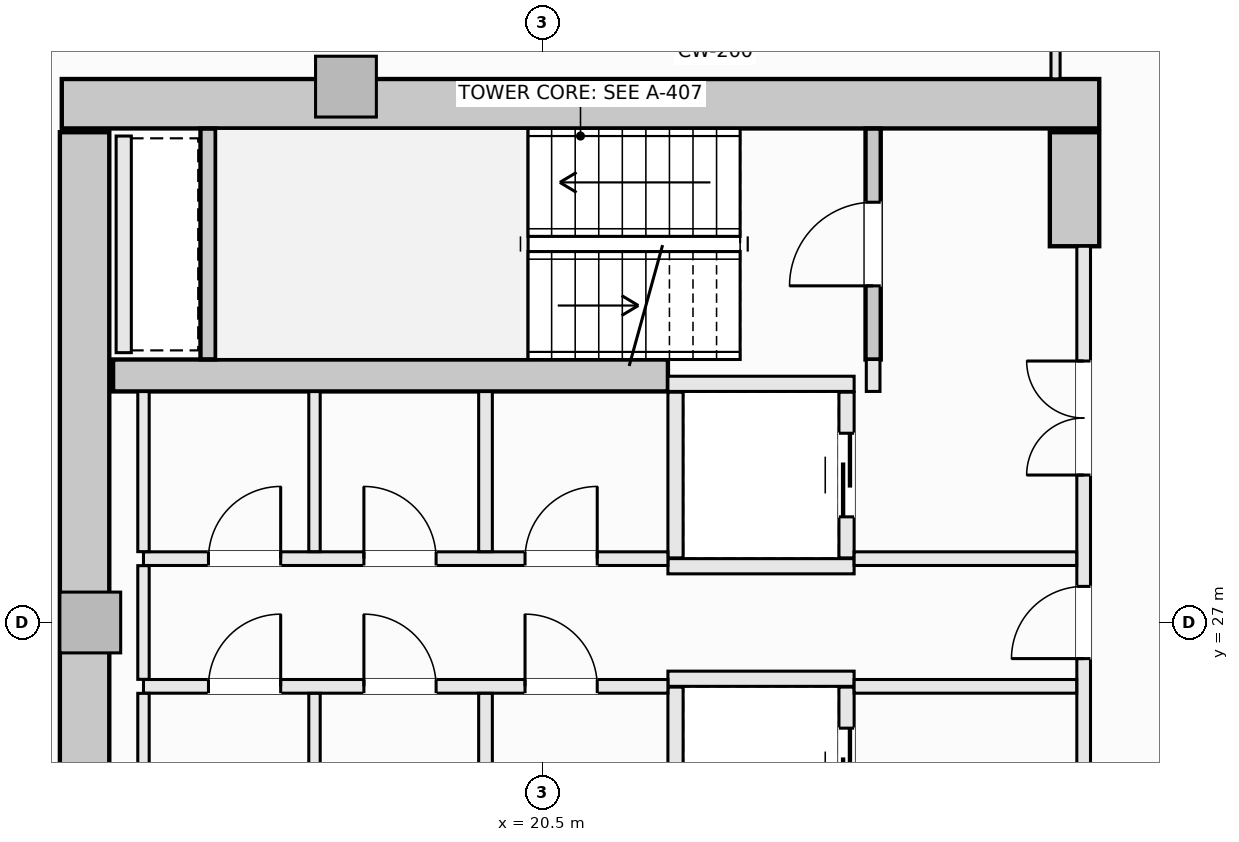
"""IFC4 building model, lengths in metres.
Left out: names, types, materials, properties, quantities, classifications, styles, units other than length and angle.
Written with IfcOpenShell. Run it as: python <this file> out.ifc"""

import sys

from ifc_helpers import new_model, si_unit, direction, frame, frame_2d, origin, origin_2d, place, context, subcontext, project, spatial, rectangle, extrude, element, fill, save


model = new_model("IFC4")
c1 = context("Model", 3, precision=1e-05, world=origin(), true_north=direction((0.0, 1.0)))
c2 = subcontext(c1, "Body", "Model", "MODEL_VIEW")
j1 = project(units=[si_unit("LENGTHUNIT", "METRE"), si_unit("PLANEANGLEUNIT", "RADIAN")], contexts=[c1])
p1 = place(None, origin())
s1 = spatial("IfcSite", under=j1, at=p1, CompositionType="ELEMENT")
p2 = place(p1, origin())
s2 = spatial("IfcBuilding", under=s1, at=p2, CompositionType="ELEMENT")
p3 = place(p2, frame((0.0, 0.0, 159.7)))
s3 = spatial("IfcBuildingStorey", under=s2, at=p3, CompositionType="ELEMENT", Elevation=159.7)
p4 = place(p3, frame((14.175, 33.825, -0.27), z_axis=(0.0, 0.0, 1.0), x_axis=(1.0, 0.0, 0.0)))
e1 = element("IfcWall", 1, at=p4, inside=s3, PredefinedType="SHEAR", context=c2, shape_type="SweptSolid", body=[
    extrude(rectangle(XDim=13.65, YDim=0.65, at=frame_2d((6.825, 0.0))), origin(), (0.0, 0.0, 1.0), 3.4),
])
p5 = place(p3, frame((14.475, 20.55, -0.27), z_axis=(0.0, 0.0, 1.0), x_axis=(0.0, 1.0, 0.0)))
e2 = element("IfcWall", 2, at=p5, inside=s3, PredefinedType="SHEAR", context=c2, shape_type="SweptSolid", body=[
    extrude(rectangle(XDim=12.9, YDim=0.65, at=frame_2d((6.45, 0.0))), origin(), (0.0, 0.0, 1.0), 3.4),
])
p6 = place(p3, frame((27.5, 31.95, -0.27), z_axis=(0.0, 0.0, 1.0), x_axis=(0.0, 1.0, 0.0)))
e3 = element("IfcWall", 3, at=p6, inside=s3, PredefinedType="SHEAR", context=c2, shape_type="SweptSolid", body=[
    extrude(rectangle(XDim=1.5, YDim=0.65, at=frame_2d((0.75, 0.0))), origin(), (0.0, 0.0, 1.0), 3.4),
])
p7 = place(p3, frame((14.85, 30.25, -0.27), z_axis=(0.0, 0.0, 1.0), x_axis=(1.0, 0.0, 0.0)))
e4 = element("IfcWall", 4, at=p7, inside=s3, PredefinedType="SHEAR", context=c2, shape_type="SweptSolid", body=[
    extrude(rectangle(XDim=7.3, YDim=0.42, at=frame_2d((3.65, 0.0))), origin(), (0.0, 0.0, 1.0), 3.4),
])
for number, where, z_axis, x_axis in (
    (5, (17.914, 34.05, -0.27), (0.0, 0.0, 1.0), (1.0, 0.0, 0.0)),
    (6, (14.55, 27.0, -0.27), (0.0, 0.0, 1.0), (1.0, 0.0, 0.0)),
):
    element("IfcColumn", number, at=place(p3, frame(where, z_axis=z_axis, x_axis=x_axis)), inside=s3, PredefinedType="PILASTER", context=c2, shape_type="SweptSolid", body=[
        extrude(rectangle(XDim=0.8, YDim=0.8, at=origin_2d()), origin(), (0.0, 0.0, 1.0), 3.4),
    ])
p8 = place(p3, frame((24.85, 30.46, -0.27), z_axis=(0.0, 0.0, 1.0), x_axis=(0.0, 1.0, 0.0)))
e7 = element("IfcWall", 7, at=p8, inside=s3, PredefinedType="SHEAR", context=c2, shape_type="SweptSolid", body=[
    extrude(rectangle(XDim=3.038, YDim=0.2, at=frame_2d((1.519, 0.0))), origin(), (0.0, 0.0, 1.0), 3.4),
])
p9 = place(p8, frame((0.969, 0.0, 0.27)))
e8 = element("IfcOpeningElement", 8, at=p9, cuts=e7, PredefinedType="OPENING", context=c2, shape_type="SweptSolid", body=[
    extrude(rectangle(XDim=1.1, YDim=2.15, at=frame_2d((0.55, 1.075))), frame((0.0, 0.11, 0.0), z_axis=(0.0, -1.0, 0.0), x_axis=(1.0, 0.0, 0.0)), (0.0, 0.0, 1.0), 0.22),
])
p10 = place(p3, frame((16.1, 30.462, -0.27), z_axis=(0.0, 0.0, 1.0), x_axis=(0.0, 1.0, 0.0)))
e9 = element("IfcWall", 9, at=p10, inside=s3, PredefinedType="SHEAR", context=c2, shape_type="SweptSolid", body=[
    extrude(rectangle(XDim=3.036, YDim=0.2, at=frame_2d((1.518, 0.0))), origin(), (0.0, 0.0, 1.0), 3.4),
])
for number, where, z_axis, x_axis in (
    (10, (22.15, 30.14, 0.0), (0.0, 0.0, 1.0), (1.0, 0.0, 0.0)),
    (11, (22.15, 27.74, 0.0), (0.0, 0.0, 1.0), (1.0, 0.0, 0.0)),
):
    element("IfcWall", number, at=place(p3, frame(where, z_axis=z_axis, x_axis=x_axis)), inside=s3, PredefinedType="SOLIDWALL", context=c2, shape_type="SweptSolid", body=[
        extrude(rectangle(XDim=2.45, YDim=0.2, at=frame_2d((1.225, 0.0))), origin(), (0.0, 0.0, 1.0), 3.13),
    ])
p11 = place(p3, frame((22.25, 27.85, 0.0), z_axis=(0.0, 0.0, 1.0), x_axis=(0.0, 1.0, 0.0)))
e12 = element("IfcWall", 12, at=p11, inside=s3, PredefinedType="SOLIDWALL", context=c2, shape_type="SweptSolid", body=[
    extrude(rectangle(XDim=2.18, YDim=0.2, at=frame_2d((1.09, 0.0))), origin(), (0.0, 0.0, 1.0), 3.13),
])
p12 = place(p3, frame((24.5, 27.85, 0.0), z_axis=(0.0, 0.0, 1.0), x_axis=(0.0, 1.0, 0.0)))
e13 = element("IfcWall", 13, at=p12, inside=s3, PredefinedType="SOLIDWALL", context=c2, shape_type="SweptSolid", body=[
    extrude(rectangle(XDim=2.18, YDim=0.2, at=frame_2d((1.09, 0.0))), origin(), (0.0, 0.0, 1.0), 3.13),
])
p13 = place(p12, frame((0.54, 0.0, 0.0)))
e14 = element("IfcOpeningElement", 14, at=p13, cuts=e13, PredefinedType="OPENING", context=c2, shape_type="SweptSolid", body=[
    extrude(rectangle(XDim=1.1, YDim=2.2, at=frame_2d((0.55, 1.1))), frame((0.0, 0.11, 0.0), z_axis=(0.0, -1.0, 0.0), x_axis=(1.0, 0.0, 0.0)), (0.0, 0.0, 1.0), 0.22),
])
p14 = place(p3, frame((22.15, 26.26, 0.0), z_axis=(0.0, 0.0, 1.0), x_axis=(1.0, 0.0, 0.0)))
e15 = element("IfcWall", 15, at=p14, inside=s3, PredefinedType="SOLIDWALL", context=c2, shape_type="SweptSolid", body=[
    extrude(rectangle(XDim=2.45, YDim=0.2, at=frame_2d((1.225, 0.0))), origin(), (0.0, 0.0, 1.0), 3.13),
])
p15 = place(p3, frame((22.25, 23.97, 0.0), z_axis=(0.0, 0.0, 1.0), x_axis=(0.0, 1.0, 0.0)))
e16 = element("IfcWall", 16, at=p15, inside=s3, PredefinedType="SOLIDWALL", context=c2, shape_type="SweptSolid", body=[
    extrude(rectangle(XDim=2.18, YDim=0.2, at=frame_2d((1.09, 0.0))), origin(), (0.0, 0.0, 1.0), 3.13),
])
p16 = place(p3, frame((24.5, 23.97, 0.0), z_axis=(0.0, 0.0, 1.0), x_axis=(0.0, 1.0, 0.0)))
e17 = element("IfcWall", 17, at=p16, inside=s3, PredefinedType="SOLIDWALL", context=c2, shape_type="SweptSolid", body=[
    extrude(rectangle(XDim=2.18, YDim=0.2, at=frame_2d((1.09, 0.0))), origin(), (0.0, 0.0, 1.0), 3.13),
])
p17 = place(p16, frame((0.54, 0.0, 0.0)))
e18 = element("IfcOpeningElement", 18, at=p17, cuts=e17, PredefinedType="OPENING", context=c2, shape_type="SweptSolid", body=[
    extrude(rectangle(XDim=1.1, YDim=2.2, at=frame_2d((0.55, 1.1))), frame((0.0, 0.11, 0.0), z_axis=(0.0, -1.0, 0.0), x_axis=(1.0, 0.0, 0.0)), (0.0, 0.0, 1.0), 0.22),
])
p18 = place(p3, frame((14.99, 30.55, 0.0), z_axis=(0.0, 0.0, 1.0), x_axis=(0.0, 1.0, 0.0)))
e19 = element("IfcWall", 19, at=p18, inside=s3, PredefinedType="SOLIDWALL", context=c2, shape_type="SweptSolid", body=[
    extrude(rectangle(XDim=2.85, YDim=0.2, at=frame_2d((1.425, 0.0))), origin(), (0.0, 0.0, 1.0), 3.13),
])
p19 = place(p3, frame((24.85, 30.04, 0.0), z_axis=(0.0, 0.0, 1.0), x_axis=(0.0, 1.0, 0.0)))
e20 = element("IfcWall", 20, at=p19, inside=s3, PredefinedType="SOLIDWALL", context=c2, shape_type="SweptSolid", body=[
    extrude(rectangle(XDim=0.42, YDim=0.18, at=frame_2d((0.21, 0.0))), origin(), (0.0, 0.0, 1.0), 3.13),
])
p20 = place(p3, frame((27.62, 22.05, 0.0), z_axis=(0.0, 0.0, 1.0), x_axis=(0.0, 1.0, 0.0)))
e21 = element("IfcWall", 21, at=p20, inside=s3, PredefinedType="SOLIDWALL", context=c2, shape_type="SweptSolid", body=[
    extrude(rectangle(XDim=9.9, YDim=0.18, at=frame_2d((4.95, 0.0))), origin(), (0.0, 0.0, 1.0), 3.13),
])
p21 = place(p20, frame((4.475, 0.0, 0.0)))
e22 = element("IfcOpeningElement", 22, at=p21, cuts=e21, PredefinedType="OPENING", context=c2, shape_type="SweptSolid", body=[
    extrude(rectangle(XDim=0.95, YDim=2.1, at=frame_2d((0.475, 1.05))), frame((0.0, 0.1, 0.0), z_axis=(0.0, -1.0, 0.0), x_axis=(1.0, 0.0, 0.0)), (0.0, 0.0, 1.0), 0.2),
])
p22 = place(p20, frame((6.89, 0.0, 0.0)))
e23 = element("IfcOpeningElement", 23, at=p22, cuts=e21, PredefinedType="OPENING", context=c2, shape_type="SweptSolid", body=[
    extrude(rectangle(XDim=1.5, YDim=2.2, at=frame_2d((0.75, 1.1))), frame((0.0, 0.1, 0.0), z_axis=(0.0, -1.0, 0.0), x_axis=(1.0, 0.0, 0.0)), (0.0, 0.0, 1.0), 0.2),
])
p23 = place(p20, frame((1.51, 0.0, 0.0)))
e24 = element("IfcOpeningElement", 24, at=p23, cuts=e21, PredefinedType="OPENING", context=c2, shape_type="SweptSolid", body=[
    extrude(rectangle(XDim=1.5, YDim=2.2, at=frame_2d((0.75, 1.1))), frame((0.0, 0.1, 0.0), z_axis=(0.0, -1.0, 0.0), x_axis=(1.0, 0.0, 0.0)), (0.0, 0.0, 1.0), 0.2),
])
p24 = place(p3, frame((15.25, 27.84, 0.0), z_axis=(0.0, 0.0, 1.0), x_axis=(1.0, 0.0, 0.0)))
e25 = element("IfcWall", 25, at=p24, inside=s3, PredefinedType="SOLIDWALL", context=c2, shape_type="SweptSolid", body=[
    extrude(rectangle(XDim=6.9, YDim=0.18, at=frame_2d((3.45, 0.0))), origin(), (0.0, 0.0, 1.0), 3.13),
])
p25 = place(p24, frame((5.02, 0.0, 0.0)))
e26 = element("IfcOpeningElement", 26, at=p25, cuts=e25, PredefinedType="OPENING", context=c2, shape_type="SweptSolid", body=[
    extrude(rectangle(XDim=0.95, YDim=2.1, at=frame_2d((0.475, 1.05))), frame((0.0, 0.1, 0.0), z_axis=(0.0, -1.0, 0.0), x_axis=(1.0, 0.0, 0.0)), (0.0, 0.0, 1.0), 0.2),
])
p26 = place(p24, frame((0.855, 0.0, 0.0)))
e27 = element("IfcOpeningElement", 27, at=p26, cuts=e25, PredefinedType="OPENING", context=c2, shape_type="SweptSolid", body=[
    extrude(rectangle(XDim=0.95, YDim=2.1, at=frame_2d((0.475, 1.05))), frame((0.0, 0.1, 0.0), z_axis=(0.0, -1.0, 0.0), x_axis=(1.0, 0.0, 0.0)), (0.0, 0.0, 1.0), 0.2),
])
p27 = place(p24, frame((2.9, 0.0, 0.0)))
e28 = element("IfcOpeningElement", 28, at=p27, cuts=e25, PredefinedType="OPENING", context=c2, shape_type="SweptSolid", body=[
    extrude(rectangle(XDim=0.95, YDim=2.1, at=frame_2d((0.475, 1.05))), frame((0.0, 0.1, 0.0), z_axis=(0.0, -1.0, 0.0), x_axis=(1.0, 0.0, 0.0)), (0.0, 0.0, 1.0), 0.2),
])
p28 = place(p3, frame((24.6, 27.84, 0.0), z_axis=(0.0, 0.0, 1.0), x_axis=(1.0, 0.0, 0.0)))
e29 = element("IfcWall", 29, at=p28, inside=s3, PredefinedType="SOLIDWALL", context=c2, shape_type="SweptSolid", body=[
    extrude(rectangle(XDim=2.928, YDim=0.18, at=frame_2d((1.464, 0.0))), origin(), (0.0, 0.0, 1.0), 3.13),
])
p29 = place(p3, frame((15.25, 26.16, 0.0), z_axis=(0.0, 0.0, 1.0), x_axis=(1.0, 0.0, 0.0)))
e30 = element("IfcWall", 30, at=p29, inside=s3, PredefinedType="SOLIDWALL", context=c2, shape_type="SweptSolid", body=[
    extrude(rectangle(XDim=6.9, YDim=0.18, at=frame_2d((3.45, 0.0))), origin(), (0.0, 0.0, 1.0), 3.13),
])
p30 = place(p29, frame((5.02, 0.0, 0.0)))
e31 = element("IfcOpeningElement", 31, at=p30, cuts=e30, PredefinedType="OPENING", context=c2, shape_type="SweptSolid", body=[
    extrude(rectangle(XDim=0.95, YDim=2.1, at=frame_2d((0.475, 1.05))), frame((0.0, 0.1, 0.0), z_axis=(0.0, -1.0, 0.0), x_axis=(1.0, 0.0, 0.0)), (0.0, 0.0, 1.0), 0.2),
])
p31 = place(p29, frame((0.855, 0.0, 0.0)))
e32 = element("IfcOpeningElement", 32, at=p31, cuts=e30, PredefinedType="OPENING", context=c2, shape_type="SweptSolid", body=[
    extrude(rectangle(XDim=0.95, YDim=2.1, at=frame_2d((0.475, 1.05))), frame((0.0, 0.1, 0.0), z_axis=(0.0, -1.0, 0.0), x_axis=(1.0, 0.0, 0.0)), (0.0, 0.0, 1.0), 0.2),
])
p32 = place(p29, frame((2.9, 0.0, 0.0)))
e33 = element("IfcOpeningElement", 33, at=p32, cuts=e30, PredefinedType="OPENING", context=c2, shape_type="SweptSolid", body=[
    extrude(rectangle(XDim=0.95, YDim=2.1, at=frame_2d((0.475, 1.05))), frame((0.0, 0.1, 0.0), z_axis=(0.0, -1.0, 0.0), x_axis=(1.0, 0.0, 0.0)), (0.0, 0.0, 1.0), 0.2),
])
p33 = place(p3, frame((24.6, 26.16, 0.0), z_axis=(0.0, 0.0, 1.0), x_axis=(1.0, 0.0, 0.0)))
e34 = element("IfcWall", 34, at=p33, inside=s3, PredefinedType="SOLIDWALL", context=c2, shape_type="SweptSolid", body=[
    extrude(rectangle(XDim=2.928, YDim=0.18, at=frame_2d((1.464, 0.0))), origin(), (0.0, 0.0, 1.0), 3.13),
])
p34 = place(p3, frame((15.25, 23.962, 0.0), z_axis=(0.0, 0.0, 1.0), x_axis=(0.0, 1.0, 0.0)))
e35 = element("IfcWall", 35, at=p34, inside=s3, PredefinedType="PARTITIONING", context=c2, shape_type="SweptSolid", body=[
    extrude(rectangle(XDim=2.106, YDim=0.15, at=frame_2d((1.053, 0.0))), origin(), (0.0, 0.0, 1.0), 3.13),
])
p35 = place(p3, frame((15.25, 26.252, 0.0), z_axis=(0.0, 0.0, 1.0), x_axis=(0.0, 1.0, 0.0)))
e36 = element("IfcWall", 36, at=p35, inside=s3, PredefinedType="PARTITIONING", context=c2, shape_type="SweptSolid", body=[
    extrude(rectangle(XDim=1.496, YDim=0.15, at=frame_2d((0.748, 0.0))), origin(), (0.0, 0.0, 1.0), 3.13),
])
p36 = place(p3, frame((15.25, 27.932, 0.0), z_axis=(0.0, 0.0, 1.0), x_axis=(0.0, 1.0, 0.0)))
e37 = element("IfcWall", 37, at=p36, inside=s3, PredefinedType="PARTITIONING", context=c2, shape_type="SweptSolid", body=[
    extrude(rectangle(XDim=2.106, YDim=0.15, at=frame_2d((1.053, 0.0))), origin(), (0.0, 0.0, 1.0), 3.13),
])
for number, where, z_axis, x_axis in (
    (38, (19.75, 23.962, 0.0), (0.0, 0.0, 1.0), (0.0, 1.0, 0.0)),
    (39, (19.75, 27.932, 0.0), (0.0, 0.0, 1.0), (0.0, 1.0, 0.0)),
):
    element("IfcWall", number, at=place(p3, frame(where, z_axis=z_axis, x_axis=x_axis)), inside=s3, PredefinedType="SOLIDWALL", context=c2, shape_type="SweptSolid", body=[
        extrude(rectangle(XDim=2.106, YDim=0.18, at=frame_2d((1.053, 0.0))), origin(), (0.0, 0.0, 1.0), 3.13),
    ])
for number, where, z_axis, x_axis in (
    (40, (17.5, 23.962, 0.0), (0.0, 0.0, 1.0), (0.0, 1.0, 0.0)),
    (41, (17.5, 27.932, 0.0), (0.0, 0.0, 1.0), (0.0, 1.0, 0.0)),
):
    element("IfcWall", number, at=place(p3, frame(where, z_axis=z_axis, x_axis=x_axis)), inside=s3, PredefinedType="PARTITIONING", context=c2, shape_type="SweptSolid", body=[
        extrude(rectangle(XDim=2.106, YDim=0.15, at=frame_2d((1.053, 0.0))), origin(), (0.0, 0.0, 1.0), 3.13),
    ])
p37 = place(p3, frame((27.25, 34.152, 0.0), z_axis=(0.0, 0.0, 1.0), x_axis=(0.0, 1.0, 0.0)))
e42 = element("IfcWall", 42, at=p37, inside=s3, PredefinedType="PARTITIONING", context=c2, shape_type="SweptSolid", body=[
    extrude(rectangle(XDim=0.806, YDim=0.12, at=frame_2d((0.403, 0.0))), origin(), (0.0, 0.0, 1.0), 3.13),
])
p38 = place(p9, origin())
e43 = element("IfcDoor", 43, at=p38, inside=s3, OperationType="SINGLE_SWING_LEFT", PredefinedType="DOOR", context=c2, shape_type="SweptSolid", body=[
    extrude(rectangle(XDim=1.1, YDim=2.15, at=frame_2d((0.55, 1.075))), frame((0.0, 0.025, 0.0), z_axis=(0.0, -1.0, 0.0), x_axis=(1.0, 0.0, 0.0)), (0.0, 0.0, 1.0), 0.05),
])
fill(e8, e43)
p39 = place(p13, origin())
e44 = element("IfcDoor", 44, at=p39, inside=s3, OperationType="SLIDING_TO_LEFT", PredefinedType="DOOR", context=c2, shape_type="SweptSolid", body=[
    extrude(rectangle(XDim=1.1, YDim=2.2, at=frame_2d((0.55, 1.1))), frame((0.0, 0.025, 0.0), z_axis=(0.0, -1.0, 0.0), x_axis=(1.0, 0.0, 0.0)), (0.0, 0.0, 1.0), 0.05),
])
fill(e14, e44)
p40 = place(p17, origin())
e45 = element("IfcDoor", 45, at=p40, inside=s3, OperationType="SLIDING_TO_LEFT", PredefinedType="DOOR", context=c2, shape_type="SweptSolid", body=[
    extrude(rectangle(XDim=1.1, YDim=2.2, at=frame_2d((0.55, 1.1))), frame((0.0, 0.025, 0.0), z_axis=(0.0, -1.0, 0.0), x_axis=(1.0, 0.0, 0.0)), (0.0, 0.0, 1.0), 0.05),
])
fill(e18, e45)
p41 = place(p21, origin())
e46 = element("IfcDoor", 46, at=p41, inside=s3, OperationType="SINGLE_SWING_LEFT", PredefinedType="DOOR", context=c2, shape_type="SweptSolid", body=[
    extrude(rectangle(XDim=0.95, YDim=2.1, at=frame_2d((0.475, 1.05))), frame((0.0, 0.025, 0.0), z_axis=(0.0, -1.0, 0.0), x_axis=(1.0, 0.0, 0.0)), (0.0, 0.0, 1.0), 0.05),
])
fill(e22, e46)
p42 = place(p22, origin())
e47 = element("IfcDoor", 47, at=p42, inside=s3, OperationType="DOUBLE_DOOR_SINGLE_SWING", PredefinedType="DOOR", context=c2, shape_type="SweptSolid", body=[
    extrude(rectangle(XDim=1.5, YDim=2.2, at=frame_2d((0.75, 1.1))), frame((0.0, 0.025, 0.0), z_axis=(0.0, -1.0, 0.0), x_axis=(1.0, 0.0, 0.0)), (0.0, 0.0, 1.0), 0.05),
])
fill(e23, e47)
p43 = place(p25, origin())
e48 = element("IfcDoor", 48, at=p43, inside=s3, OperationType="SINGLE_SWING_RIGHT", PredefinedType="DOOR", context=c2, shape_type="SweptSolid", body=[
    extrude(rectangle(XDim=0.95, YDim=2.1, at=frame_2d((0.475, 1.05))), frame((0.0, 0.025, 0.0), z_axis=(0.0, -1.0, 0.0), x_axis=(1.0, 0.0, 0.0)), (0.0, 0.0, 1.0), 0.05),
])
fill(e26, e48)
p44 = place(p30, origin())
e49 = element("IfcDoor", 49, at=p44, inside=s3, OperationType="SINGLE_SWING_LEFT", PredefinedType="DOOR", context=c2, shape_type="SweptSolid", body=[
    extrude(rectangle(XDim=0.95, YDim=2.1, at=frame_2d((0.475, 1.05))), frame((0.0, 0.025, 0.0), z_axis=(0.0, -1.0, 0.0), x_axis=(1.0, 0.0, 0.0)), (0.0, 0.0, 1.0), 0.05),
])
fill(e31, e49)
p45 = place(p26, origin())
e50 = element("IfcDoor", 50, at=p45, inside=s3, OperationType="SINGLE_SWING_RIGHT", PredefinedType="DOOR", context=c2, shape_type="SweptSolid", body=[
    extrude(rectangle(XDim=0.95, YDim=2.1, at=frame_2d((0.475, 1.05))), frame((0.0, 0.025, 0.0), z_axis=(0.0, -1.0, 0.0), x_axis=(1.0, 0.0, 0.0)), (0.0, 0.0, 1.0), 0.05),
])
fill(e27, e50)
p46 = place(p27, origin())
e51 = element("IfcDoor", 51, at=p46, inside=s3, OperationType="SINGLE_SWING_LEFT", PredefinedType="DOOR", context=c2, shape_type="SweptSolid", body=[
    extrude(rectangle(XDim=0.95, YDim=2.1, at=frame_2d((0.475, 1.05))), frame((0.0, 0.025, 0.0), z_axis=(0.0, -1.0, 0.0), x_axis=(1.0, 0.0, 0.0)), (0.0, 0.0, 1.0), 0.05),
])
fill(e28, e51)
p47 = place(p31, origin())
e52 = element("IfcDoor", 52, at=p47, inside=s3, OperationType="SINGLE_SWING_RIGHT", PredefinedType="DOOR", context=c2, shape_type="SweptSolid", body=[
    extrude(rectangle(XDim=0.95, YDim=2.1, at=frame_2d((0.475, 1.05))), frame((0.0, 0.025, 0.0), z_axis=(0.0, -1.0, 0.0), x_axis=(1.0, 0.0, 0.0)), (0.0, 0.0, 1.0), 0.05),
])
fill(e32, e52)
p48 = place(p32, origin())
e53 = element("IfcDoor", 53, at=p48, inside=s3, OperationType="SINGLE_SWING_LEFT", PredefinedType="DOOR", context=c2, shape_type="SweptSolid", body=[
    extrude(rectangle(XDim=0.95, YDim=2.1, at=frame_2d((0.475, 1.05))), frame((0.0, 0.025, 0.0), z_axis=(0.0, -1.0, 0.0), x_axis=(1.0, 0.0, 0.0)), (0.0, 0.0, 1.0), 0.05),
])
fill(e33, e53)
save(model, sys.argv[1])
